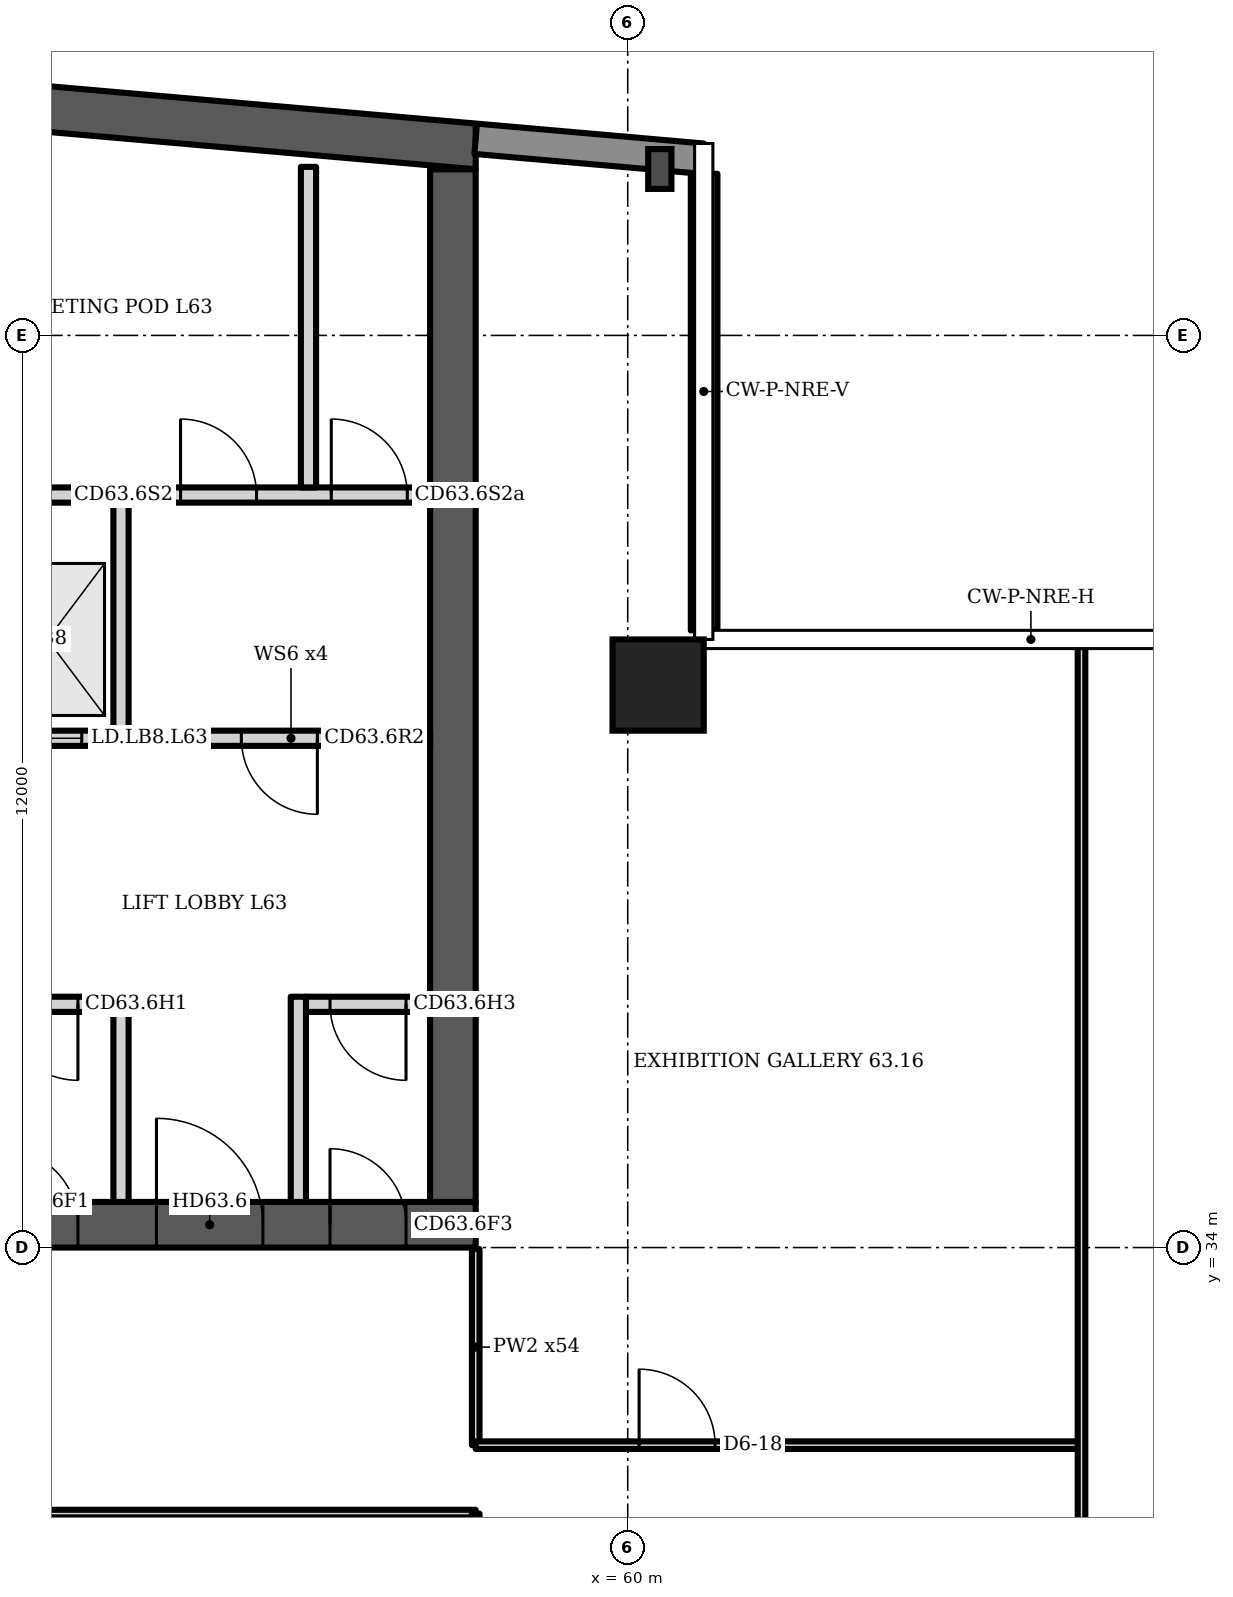
"""IFC4 building model, lengths in metres.
Left out: names, types, materials, properties, quantities, classifications, styles, units other than length and angle.
Written with IfcOpenShell. Run it as: python <this file> out.ifc"""

import sys

from ifc_helpers import new_model, si_unit, direction, frame, frame_2d, origin, origin_2d, place, context, subcontext, project, spatial, polyline, rectangle, i_section, outline, extrude, element, fill, save


model = new_model("IFC4")
c1 = context("Model", 3, precision=1e-05, world=origin(), true_north=direction((0.0, 1.0)))
c2 = subcontext(c1, "Body", "Model", "MODEL_VIEW")
j1 = project(units=[si_unit("LENGTHUNIT", "METRE"), si_unit("PLANEANGLEUNIT", "RADIAN")], contexts=[c1])
p1 = place(None, origin())
s1 = spatial("IfcSite", under=j1, at=p1, CompositionType="ELEMENT")
p2 = place(p1, origin())
s2 = spatial("IfcBuilding", under=s1, at=p2, CompositionType="ELEMENT")
p3 = place(p2, frame((0.0, 0.0, 250.3)))
s3 = spatial("IfcBuildingStorey", under=s2, at=p3, CompositionType="ELEMENT", Elevation=250.3)
p4 = place(p3, frame((0.0, 0.0, -0.0)))
e1 = element("IfcWall", 1, at=p4, inside=s3, PredefinedType="SHEAR", context=c2, shape_type="SweptSolid", body=[
    extrude(outline(polyline([(23.0, 48.185), (40.5, 49.716), (58.0, 48.185), (58.0, 48.787), (40.5, 50.318), (23.0, 48.787), (23.0, 48.185)])), origin(), (0.0, 0.0, 1.0), 3.6),
])
p5 = place(p3, frame((23.0, 34.3, 0.0), z_axis=(0.0, 0.0, 1.0), x_axis=(1.0, 0.0, 0.0)))
e2 = element("IfcWall", 2, at=p5, inside=s3, PredefinedType="SHEAR", context=c2, shape_type="SweptSolid", body=[
    extrude(rectangle(XDim=35.0, YDim=0.6, at=frame_2d((17.5, 0.0))), origin(), (0.0, 0.0, 1.0), 3.6),
])
p6 = place(p5, frame((0.65, 0.0, 0.0)))
e3 = element("IfcOpeningElement", 3, at=p6, cuts=e2, PredefinedType="OPENING", context=c2, shape_type="SweptSolid", body=[
    extrude(rectangle(XDim=1.2, YDim=2.1, at=frame_2d((0.6, 1.05))), frame((0.0, 0.31, 0.0), z_axis=(0.0, -1.0, 0.0), x_axis=(1.0, 0.0, 0.0)), (0.0, 0.0, 1.0), 0.62),
])
p7 = place(p5, frame((7.717, 0.0, 0.0)))
e4 = element("IfcOpeningElement", 4, at=p7, cuts=e2, PredefinedType="OPENING", context=c2, shape_type="SweptSolid", body=[
    extrude(rectangle(XDim=1.1, YDim=2.1, at=frame_2d((0.55, 1.05))), frame((0.0, 0.31, 0.0), z_axis=(0.0, -1.0, 0.0), x_axis=(1.0, 0.0, 0.0)), (0.0, 0.0, 1.0), 0.62),
])
p8 = place(p5, frame((12.183, 0.0, 0.0)))
e5 = element("IfcOpeningElement", 5, at=p8, cuts=e2, PredefinedType="OPENING", context=c2, shape_type="SweptSolid", body=[
    extrude(rectangle(XDim=1.1, YDim=2.1, at=frame_2d((0.55, 1.05))), frame((0.0, 0.31, 0.0), z_axis=(0.0, -1.0, 0.0), x_axis=(1.0, 0.0, 0.0)), (0.0, 0.0, 1.0), 0.62),
])
p9 = place(p5, frame((9.8, 0.0, 0.0)))
e6 = element("IfcOpeningElement", 6, at=p9, cuts=e2, PredefinedType="OPENING", context=c2, shape_type="SweptSolid", body=[
    extrude(rectangle(XDim=1.4, YDim=2.1, at=frame_2d((0.7, 1.05))), frame((0.0, 0.31, 0.0), z_axis=(0.0, -1.0, 0.0), x_axis=(1.0, 0.0, 0.0)), (0.0, 0.0, 1.0), 0.62),
])
p10 = place(p5, frame((14.717, 0.0, 0.0)))
e7 = element("IfcOpeningElement", 7, at=p10, cuts=e2, PredefinedType="OPENING", context=c2, shape_type="SweptSolid", body=[
    extrude(rectangle(XDim=1.1, YDim=2.1, at=frame_2d((0.55, 1.05))), frame((0.0, 0.31, 0.0), z_axis=(0.0, -1.0, 0.0), x_axis=(1.0, 0.0, 0.0)), (0.0, 0.0, 1.0), 0.62),
])
p11 = place(p5, frame((16.95, 0.0, 0.0)))
e8 = element("IfcOpeningElement", 8, at=p11, cuts=e2, PredefinedType="OPENING", context=c2, shape_type="SweptSolid", body=[
    extrude(rectangle(XDim=1.1, YDim=2.1, at=frame_2d((0.55, 1.05))), frame((0.0, 0.31, 0.0), z_axis=(0.0, -1.0, 0.0), x_axis=(1.0, 0.0, 0.0)), (0.0, 0.0, 1.0), 0.62),
])
p12 = place(p5, frame((19.183, 0.0, 0.0)))
e9 = element("IfcOpeningElement", 9, at=p12, cuts=e2, PredefinedType="OPENING", context=c2, shape_type="SweptSolid", body=[
    extrude(rectangle(XDim=1.1, YDim=2.1, at=frame_2d((0.55, 1.05))), frame((0.0, 0.31, 0.0), z_axis=(0.0, -1.0, 0.0), x_axis=(1.0, 0.0, 0.0)), (0.0, 0.0, 1.0), 0.62),
])
p13 = place(p5, frame((26.15, 0.0, 0.0)))
e10 = element("IfcOpeningElement", 10, at=p13, cuts=e2, PredefinedType="OPENING", context=c2, shape_type="SweptSolid", body=[
    extrude(rectangle(XDim=1.2, YDim=2.1, at=frame_2d((0.6, 1.05))), frame((0.0, 0.31, 0.0), z_axis=(0.0, -1.0, 0.0), x_axis=(1.0, 0.0, 0.0)), (0.0, 0.0, 1.0), 0.62),
])
p14 = place(p5, frame((28.767, 0.0, 0.0)))
e11 = element("IfcOpeningElement", 11, at=p14, cuts=e2, PredefinedType="OPENING", context=c2, shape_type="SweptSolid", body=[
    extrude(rectangle(XDim=1.0, YDim=2.1, at=frame_2d((0.5, 1.05))), frame((0.0, 0.31, 0.0), z_axis=(0.0, -1.0, 0.0), x_axis=(1.0, 0.0, 0.0)), (0.0, 0.0, 1.0), 0.62),
])
p15 = place(p5, frame((33.083, 0.0, 0.0)))
e12 = element("IfcOpeningElement", 12, at=p15, cuts=e2, PredefinedType="OPENING", context=c2, shape_type="SweptSolid", body=[
    extrude(rectangle(XDim=1.0, YDim=2.1, at=frame_2d((0.5, 1.05))), frame((0.0, 0.31, 0.0), z_axis=(0.0, -1.0, 0.0), x_axis=(1.0, 0.0, 0.0)), (0.0, 0.0, 1.0), 0.62),
])
p16 = place(p5, frame((30.8, 0.0, 0.0)))
e13 = element("IfcOpeningElement", 13, at=p16, cuts=e2, PredefinedType="OPENING", context=c2, shape_type="SweptSolid", body=[
    extrude(rectangle(XDim=1.4, YDim=2.1, at=frame_2d((0.7, 1.05))), frame((0.0, 0.31, 0.0), z_axis=(0.0, -1.0, 0.0), x_axis=(1.0, 0.0, 0.0)), (0.0, 0.0, 1.0), 0.62),
])
p17 = place(p3, frame((57.7, 34.6, 0.0), z_axis=(0.0, 0.0, 1.0), x_axis=(0.0, 1.0, 0.0)))
e14 = element("IfcWall", 14, at=p17, inside=s3, PredefinedType="SHEAR", context=c2, shape_type="SweptSolid", body=[
    extrude(rectangle(XDim=13.585, YDim=0.6, at=frame_2d((6.792, 0.0))), origin(), (0.0, 0.0, 1.0), 3.6),
])
p18 = place(p3, frame((60.4, 41.4, 0.0), z_axis=(0.0, 0.0, 1.0), x_axis=(1.0, 0.0, 0.0)))
e15 = element("IfcColumn", 15, at=p18, inside=s3, PredefinedType="COLUMN", context=c2, shape_type="SweptSolid", body=[
    extrude(rectangle(XDim=1.2, YDim=1.2, at=origin_2d()), origin(), (0.0, 0.0, 1.0), 3.6),
])
p19 = place(p3, frame((60.422, 48.189, 0.0), z_axis=(0.0, 0.0, 1.0), x_axis=(1.0, 0.0, 0.0)))
e16 = element("IfcColumn", 16, at=p19, inside=s3, PredefinedType="COLUMN", context=c2, shape_type="SweptSolid", body=[
    extrude(i_section(OverallWidth=0.306, OverallDepth=0.524, WebThickness=0.021, FlangeThickness=0.04, FilletRadius=0.027, at=origin_2d()), origin(), (0.0, 0.0, 1.0), 3.6),
])
p20 = place(p3, frame((60.983, 48.326, 0.0), z_axis=(0.0, 0.0, 1.0), x_axis=(-0.996194, 0.087168, 0.0)))
e17 = element("IfcWall", 17, at=p20, inside=s3, PredefinedType="SOLIDWALL", context=c2, shape_type="SweptSolid", body=[
    extrude(rectangle(XDim=2.994, YDim=0.4, at=frame_2d((1.497, 0.0))), origin(), (0.0, 0.0, 1.0), 3.2),
])
p21 = place(p3, frame((61.005, 42.12, 0.0), z_axis=(0.0, 0.0, 1.0), x_axis=(0.0, 1.0, 0.0)))
e18 = element("IfcWall", 18, at=p21, inside=s3, PredefinedType="SOLIDWALL", context=c2, shape_type="SweptSolid", body=[
    extrude(rectangle(XDim=6.006, YDim=0.35, at=frame_2d((3.003, 0.0))), origin(), (0.0, 0.0, 1.0), 1.0),
])
p22 = place(p3, frame((51.3, 37.2, 0.0), z_axis=(0.0, 0.0, 1.0), x_axis=(1.0, 0.0, 0.0)))
e19 = element("IfcWall", 19, at=p22, inside=s3, PredefinedType="PARTITIONING", context=c2, shape_type="SweptSolid", body=[
    extrude(rectangle(XDim=1.933, YDim=0.2, at=frame_2d((0.967, 0.0))), origin(), (0.0, 0.0, 1.0), 3.2),
])
p23 = place(p22, frame((0.467, 0.0, 0.0)))
e20 = element("IfcOpeningElement", 20, at=p23, cuts=e19, PredefinedType="OPENING", context=c2, shape_type="SweptSolid", body=[
    extrude(rectangle(XDim=1.0, YDim=2.1, at=frame_2d((0.5, 1.05))), frame((0.0, 0.11, 0.0), z_axis=(0.0, -1.0, 0.0), x_axis=(1.0, 0.0, 0.0)), (0.0, 0.0, 1.0), 0.22),
])
p24 = place(p3, frame((55.767, 37.2, 0.0), z_axis=(0.0, 0.0, 1.0), x_axis=(1.0, 0.0, 0.0)))
e21 = element("IfcWall", 21, at=p24, inside=s3, PredefinedType="PARTITIONING", context=c2, shape_type="SweptSolid", body=[
    extrude(rectangle(XDim=1.633, YDim=0.2, at=frame_2d((0.817, 0.0))), origin(), (0.0, 0.0, 1.0), 3.2),
])
p25 = place(p24, frame((0.317, 0.0, 0.0)))
e22 = element("IfcOpeningElement", 22, at=p25, cuts=e21, PredefinedType="OPENING", context=c2, shape_type="SweptSolid", body=[
    extrude(rectangle(XDim=1.0, YDim=2.1, at=frame_2d((0.5, 1.05))), frame((0.0, 0.11, 0.0), z_axis=(0.0, -1.0, 0.0), x_axis=(1.0, 0.0, 0.0)), (0.0, 0.0, 1.0), 0.22),
])
p26 = place(p3, frame((51.3, 40.7, 0.0), z_axis=(0.0, 0.0, 1.0), x_axis=(1.0, 0.0, 0.0)))
e23 = element("IfcWall", 23, at=p26, inside=s3, PredefinedType="PARTITIONING", context=c2, shape_type="SweptSolid", body=[
    extrude(rectangle(XDim=6.1, YDim=0.2, at=frame_2d((3.05, 0.0))), origin(), (0.0, 0.0, 1.0), 3.2),
])
p27 = place(p26, frame((0.417, 0.0, 0.0)))
e24 = element("IfcOpeningElement", 24, at=p27, cuts=e23, PredefinedType="OPENING", context=c2, shape_type="SweptSolid", body=[
    extrude(rectangle(XDim=1.1, YDim=2.1, at=frame_2d((0.55, 1.05))), frame((0.0, 0.11, 0.0), z_axis=(0.0, -1.0, 0.0), x_axis=(1.0, 0.0, 0.0)), (0.0, 0.0, 1.0), 0.22),
])
p28 = place(p26, frame((3.617, 0.0, 0.0)))
e25 = element("IfcOpeningElement", 25, at=p28, cuts=e23, PredefinedType="OPENING", context=c2, shape_type="SweptSolid", body=[
    extrude(rectangle(XDim=1.0, YDim=2.1, at=frame_2d((0.5, 1.05))), frame((0.0, 0.11, 0.0), z_axis=(0.0, -1.0, 0.0), x_axis=(1.0, 0.0, 0.0)), (0.0, 0.0, 1.0), 0.22),
])
p29 = place(p3, frame((51.3, 43.9, 0.0), z_axis=(0.0, 0.0, 1.0), x_axis=(1.0, 0.0, 0.0)))
e26 = element("IfcWall", 26, at=p29, inside=s3, PredefinedType="PARTITIONING", context=c2, shape_type="SweptSolid", body=[
    extrude(rectangle(XDim=6.1, YDim=0.2, at=frame_2d((3.05, 0.0))), origin(), (0.0, 0.0, 1.0), 3.2),
])
p30 = place(p29, frame((2.817, 0.0, 0.0)))
e27 = element("IfcOpeningElement", 27, at=p30, cuts=e26, PredefinedType="OPENING", context=c2, shape_type="SweptSolid", body=[
    extrude(rectangle(XDim=1.0, YDim=2.1, at=frame_2d((0.5, 1.05))), frame((0.0, 0.11, 0.0), z_axis=(0.0, -1.0, 0.0), x_axis=(1.0, 0.0, 0.0)), (0.0, 0.0, 1.0), 0.22),
])
p31 = place(p29, frame((4.8, 0.0, 0.0)))
e28 = element("IfcOpeningElement", 28, at=p31, cuts=e26, PredefinedType="OPENING", context=c2, shape_type="SweptSolid", body=[
    extrude(rectangle(XDim=1.0, YDim=2.1, at=frame_2d((0.5, 1.05))), frame((0.0, 0.11, 0.0), z_axis=(0.0, -1.0, 0.0), x_axis=(1.0, 0.0, 0.0)), (0.0, 0.0, 1.0), 0.22),
])
p32 = place(p3, frame((0.0, 0.0, -0.0)))
e29 = element("IfcWall", 29, at=p32, inside=s3, PredefinedType="PARTITIONING", context=c2, shape_type="SweptSolid", body=[
    extrude(outline(polyline([(53.233, 34.6), (53.233, 37.3), (53.433, 37.3), (53.433, 34.6), (53.233, 34.6)])), origin(), (0.0, 0.0, 1.0), 3.2),
])
p33 = place(p3, frame((0.0, 0.0, -0.0)))
e30 = element("IfcWall", 30, at=p33, inside=s3, PredefinedType="PARTITIONING", context=c2, shape_type="SweptSolid", body=[
    extrude(outline(polyline([(55.567, 34.6), (55.567, 37.3), (55.767, 37.3), (55.767, 34.6), (55.567, 34.6)])), origin(), (0.0, 0.0, 1.0), 3.2),
])
p34 = place(p3, frame((0.0, 0.0, -0.0)))
e31 = element("IfcWall", 31, at=p34, inside=s3, PredefinedType="PARTITIONING", context=c2, shape_type="SweptSolid", body=[
    extrude(outline(polyline([(53.433, 40.8), (53.433, 43.8), (53.233, 43.8), (53.233, 40.8), (53.433, 40.8)])), origin(), (0.0, 0.0, 1.0), 3.2),
])
p35 = place(p3, frame((55.8, 44.0, 0.0), z_axis=(0.0, 0.0, 1.0), x_axis=(0.0, 1.0, 0.0)))
e32 = element("IfcWall", 32, at=p35, inside=s3, PredefinedType="PARTITIONING", context=c2, shape_type="SweptSolid", body=[
    extrude(rectangle(XDim=4.218, YDim=0.2, at=frame_2d((2.109, 0.0))), origin(), (0.0, 0.0, 1.0), 3.2),
])
p36 = place(p3, frame((51.82, 30.5, 0.0), z_axis=(0.0, 0.0, 1.0), x_axis=(1.0, 0.0, 0.0)))
e33 = element("IfcWall", 33, at=p36, inside=s3, PredefinedType="PARTITIONING", context=c2, shape_type="SweptSolid", body=[
    extrude(rectangle(XDim=6.18, YDim=0.1, at=frame_2d((3.09, 0.0))), origin(), (0.0, 0.0, 1.0), 3.2),
])
p37 = place(p3, frame((58.0, 29.6, 0.0), z_axis=(0.0, 0.0, 1.0), x_axis=(0.0, 1.0, 0.0)))
e34 = element("IfcWall", 34, at=p37, inside=s3, PredefinedType="PARTITIONING", context=c2, shape_type="SweptSolid", body=[
    extrude(rectangle(XDim=0.9, YDim=0.1, at=frame_2d((0.45, 0.0))), origin(), (0.0, 0.0, 1.0), 3.2),
])
p38 = place(p3, frame((58.0, 31.4, 0.0), z_axis=(0.0, 0.0, 1.0), x_axis=(0.0, 1.0, 0.0)))
e35 = element("IfcWall", 35, at=p38, inside=s3, PredefinedType="PARTITIONING", context=c2, shape_type="SweptSolid", body=[
    extrude(rectangle(XDim=2.58, YDim=0.1, at=frame_2d((1.29, 0.0))), origin(), (0.0, 0.0, 1.0), 3.2),
])
p39 = place(p3, frame((58.0, 31.4, 0.0), z_axis=(0.0, 0.0, 1.0), x_axis=(1.0, 0.0, 0.0)))
e36 = element("IfcWall", 36, at=p39, inside=s3, PredefinedType="PARTITIONING", context=c2, shape_type="SweptSolid", body=[
    extrude(rectangle(XDim=7.97, YDim=0.1, at=frame_2d((3.985, 0.0))), origin(), (0.0, 0.0, 1.0), 3.2),
])
p40 = place(p39, frame((2.15, 0.0, 0.0)))
e37 = element("IfcOpeningElement", 37, at=p40, cuts=e36, PredefinedType="OPENING", context=c2, shape_type="SweptSolid", body=[
    extrude(rectangle(XDim=1.0, YDim=2.1, at=frame_2d((0.5, 1.05))), frame((0.0, 0.06, 0.0), z_axis=(0.0, -1.0, 0.0), x_axis=(1.0, 0.0, 0.0)), (0.0, 0.0, 1.0), 0.12),
])
p41 = place(p3, frame((65.97, 29.545, 0.0), z_axis=(0.0, 0.0, 1.0), x_axis=(0.0, 1.0, 0.0)))
e38 = element("IfcWall", 38, at=p41, inside=s3, PredefinedType="PARTITIONING", context=c2, shape_type="SweptSolid", body=[
    extrude(rectangle(XDim=12.435, YDim=0.1, at=frame_2d((6.218, 0.0))), origin(), (0.0, 0.0, 1.0), 3.2),
])
p42 = place(p14, origin())
e39 = element("IfcDoor", 39, at=p42, inside=s3, OperationType="SINGLE_SWING_LEFT", PredefinedType="DOOR", context=c2, shape_type="SweptSolid", body=[
    extrude(rectangle(XDim=1.0, YDim=2.1, at=frame_2d((0.5, 1.05))), frame((0.0, 0.025, 0.0), z_axis=(0.0, -1.0, 0.0), x_axis=(1.0, 0.0, 0.0)), (0.0, 0.0, 1.0), 0.05),
])
fill(e11, e39)
p43 = place(p23, origin())
e40 = element("IfcDoor", 40, at=p43, inside=s3, OperationType="SINGLE_SWING_RIGHT", PredefinedType="DOOR", context=c2, shape_type="SweptSolid", body=[
    extrude(rectangle(XDim=1.0, YDim=2.1, at=frame_2d((0.5, 1.05))), frame((0.0, 0.025, 0.0), z_axis=(0.0, -1.0, 0.0), x_axis=(1.0, 0.0, 0.0)), (0.0, 0.0, 1.0), 0.05),
])
fill(e20, e40)
p44 = place(p15, origin())
e41 = element("IfcDoor", 41, at=p44, inside=s3, OperationType="SINGLE_SWING_LEFT", PredefinedType="DOOR", context=c2, shape_type="SweptSolid", body=[
    extrude(rectangle(XDim=1.0, YDim=2.1, at=frame_2d((0.5, 1.05))), frame((0.0, 0.025, 0.0), z_axis=(0.0, -1.0, 0.0), x_axis=(1.0, 0.0, 0.0)), (0.0, 0.0, 1.0), 0.05),
])
fill(e12, e41)
p45 = place(p25, origin())
e42 = element("IfcDoor", 42, at=p45, inside=s3, OperationType="SINGLE_SWING_RIGHT", PredefinedType="DOOR", context=c2, shape_type="SweptSolid", body=[
    extrude(rectangle(XDim=1.0, YDim=2.1, at=frame_2d((0.5, 1.05))), frame((0.0, 0.025, 0.0), z_axis=(0.0, -1.0, 0.0), x_axis=(1.0, 0.0, 0.0)), (0.0, 0.0, 1.0), 0.05),
])
fill(e22, e42)
p46 = place(p16, origin())
e43 = element("IfcDoor", 43, at=p46, inside=s3, OperationType="DOUBLE_DOOR_SINGLE_SWING", PredefinedType="DOOR", context=c2, shape_type="SweptSolid", body=[
    extrude(rectangle(XDim=1.4, YDim=2.1, at=frame_2d((0.7, 1.05))), frame((0.0, 0.025, 0.0), z_axis=(0.0, -1.0, 0.0), x_axis=(1.0, 0.0, 0.0)), (0.0, 0.0, 1.0), 0.05),
])
fill(e13, e43)
p47 = place(p27, origin())
e44 = element("IfcDoor", 44, at=p47, inside=s3, OperationType="DOUBLE_DOOR_SLIDING", PredefinedType="DOOR", context=c2, shape_type="SweptSolid", body=[
    extrude(rectangle(XDim=1.1, YDim=2.1, at=frame_2d((0.55, 1.05))), frame((0.0, 0.025, 0.0), z_axis=(0.0, -1.0, 0.0), x_axis=(1.0, 0.0, 0.0)), (0.0, 0.0, 1.0), 0.05),
])
fill(e24, e44)
p48 = place(p28, origin())
e45 = element("IfcDoor", 45, at=p48, inside=s3, OperationType="SINGLE_SWING_RIGHT", PredefinedType="DOOR", context=c2, shape_type="SweptSolid", body=[
    extrude(rectangle(XDim=1.0, YDim=2.1, at=frame_2d((0.5, 1.05))), frame((0.0, 0.025, 0.0), z_axis=(0.0, -1.0, 0.0), x_axis=(1.0, 0.0, 0.0)), (0.0, 0.0, 1.0), 0.05),
])
fill(e25, e45)
p49 = place(p30, origin())
e46 = element("IfcDoor", 46, at=p49, inside=s3, OperationType="SINGLE_SWING_LEFT", PredefinedType="DOOR", context=c2, shape_type="SweptSolid", body=[
    extrude(rectangle(XDim=1.0, YDim=2.1, at=frame_2d((0.5, 1.05))), frame((0.0, 0.025, 0.0), z_axis=(0.0, -1.0, 0.0), x_axis=(1.0, 0.0, 0.0)), (0.0, 0.0, 1.0), 0.05),
])
fill(e27, e46)
p50 = place(p31, origin())
e47 = element("IfcDoor", 47, at=p50, inside=s3, OperationType="SINGLE_SWING_LEFT", PredefinedType="DOOR", context=c2, shape_type="SweptSolid", body=[
    extrude(rectangle(XDim=1.0, YDim=2.1, at=frame_2d((0.5, 1.05))), frame((0.0, 0.025, 0.0), z_axis=(0.0, -1.0, 0.0), x_axis=(1.0, 0.0, 0.0)), (0.0, 0.0, 1.0), 0.05),
])
fill(e28, e47)
p51 = place(p40, origin())
e48 = element("IfcDoor", 48, at=p51, inside=s3, OperationType="SINGLE_SWING_LEFT", PredefinedType="DOOR", context=c2, shape_type="SweptSolid", body=[
    extrude(rectangle(XDim=1.0, YDim=2.1, at=frame_2d((0.5, 1.05))), frame((0.0, 0.025, 0.0), z_axis=(0.0, -1.0, 0.0), x_axis=(1.0, 0.0, 0.0)), (0.0, 0.0, 1.0), 0.05),
])
fill(e37, e48)
save(model, sys.argv[1])
